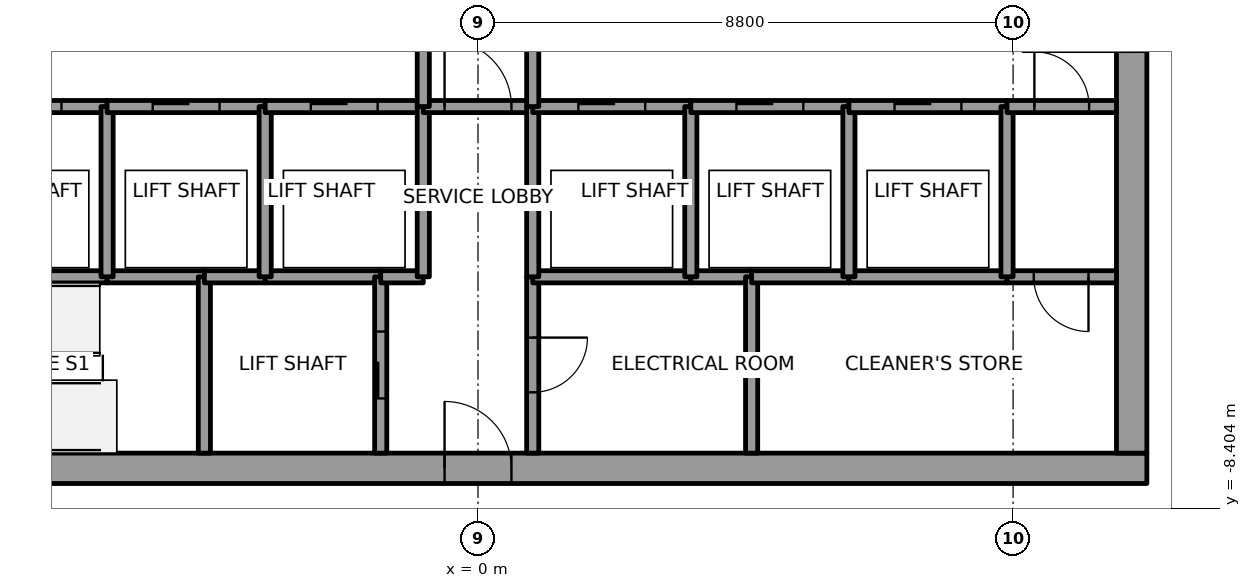
"""IFC4 building model, lengths in metres.
Left out: names, types, materials, properties, quantities, classifications, styles, units other than length and angle.
Written with IfcOpenShell. Run it as: python <this file> out.ifc"""

import sys

from ifc_helpers import new_model, si_unit, direction, frame, frame_2d, origin, place, context, subcontext, project, spatial, rectangle, extrude, element, fill, save


model = new_model("IFC4")
c1 = context("Model", 3, precision=1e-05, world=origin(), true_north=direction((0.0, 1.0)))
c2 = subcontext(c1, "Body", "Model", "MODEL_VIEW")
j1 = project(units=[si_unit("LENGTHUNIT", "METRE"), si_unit("PLANEANGLEUNIT", "RADIAN")], contexts=[c1])
p1 = place(None, origin())
s1 = spatial("IfcSite", under=j1, at=p1, CompositionType="ELEMENT")
p2 = place(p1, origin())
s2 = spatial("IfcBuilding", under=s1, at=p2, CompositionType="ELEMENT")
p3 = place(p2, frame((0.0, 0.0, 283.0)))
s3 = spatial("IfcBuildingStorey", under=s2, at=p3, CompositionType="ELEMENT", Elevation=283.0)
p4 = place(p3, frame((-11.0, -7.75, 0.0), z_axis=(0.0, 0.0, 1.0), x_axis=(1.0, 0.0, 0.0)))
e1 = element("IfcWall", 1, at=p4, inside=s3, PredefinedType="SHEAR", context=c2, shape_type="SweptSolid", body=[
    extrude(rectangle(XDim=22.0, YDim=0.5, at=frame_2d((11.0, 0.0))), origin(), (0.0, 0.0, 1.0), 4.0),
])
p5 = place(p4, frame((10.45, 0.0, 0.0)))
e2 = element("IfcOpeningElement", 2, at=p5, cuts=e1, PredefinedType="OPENING", context=c2, shape_type="SweptSolid", body=[
    extrude(rectangle(XDim=1.1, YDim=2.1, at=frame_2d((0.55, 1.05))), frame((0.0, 0.25, 0.0), z_axis=(0.0, -1.0, 0.0), x_axis=(1.0, 0.0, 0.0)), (0.0, 0.0, 1.0), 0.5),
])
p6 = place(p3, frame((10.75, -7.5, 0.0), z_axis=(0.0, 0.0, 1.0), x_axis=(0.0, 1.0, 0.0)))
e3 = element("IfcWall", 3, at=p6, inside=s3, PredefinedType="SHEAR", context=c2, shape_type="SweptSolid", body=[
    extrude(rectangle(XDim=15.0, YDim=0.5, at=frame_2d((7.5, 0.0))), origin(), (0.0, 0.0, 1.0), 4.0),
])
p7 = place(p6, frame((6.6, 0.0, 0.0)))
e4 = element("IfcOpeningElement", 4, at=p7, cuts=e3, PredefinedType="OPENING", context=c2, shape_type="SweptSolid", body=[
    extrude(rectangle(XDim=1.8, YDim=2.1, at=frame_2d((0.9, 1.05))), frame((0.0, 0.25, 0.0), z_axis=(0.0, -1.0, 0.0), x_axis=(1.0, 0.0, 0.0)), (0.0, 0.0, 1.0), 0.5),
])
p8 = place(p3, frame((-8.7, -4.6, 0.0), z_axis=(0.0, 0.0, 1.0), x_axis=(1.0, 0.0, 0.0)))
e5 = element("IfcWall", 5, at=p8, inside=s3, PredefinedType="SOLIDWALL", context=c2, shape_type="SweptSolid", body=[
    extrude(rectangle(XDim=2.6, YDim=0.2, at=frame_2d((1.3, 0.0))), origin(), (0.0, 0.0, 1.0), 3.85),
])
p9 = place(p3, frame((-8.7, -1.8, 0.0), z_axis=(0.0, 0.0, 1.0), x_axis=(1.0, 0.0, 0.0)))
e6 = element("IfcWall", 6, at=p9, inside=s3, PredefinedType="SOLIDWALL", context=c2, shape_type="SweptSolid", body=[
    extrude(rectangle(XDim=2.6, YDim=0.2, at=frame_2d((1.3, 0.0))), origin(), (0.0, 0.0, 1.0), 3.85),
])
p10 = place(p9, frame((0.75, 0.0, 0.0)))
e7 = element("IfcOpeningElement", 7, at=p10, cuts=e6, PredefinedType="OPENING", context=c2, shape_type="SweptSolid", body=[
    extrude(rectangle(XDim=1.1, YDim=2.1, at=frame_2d((0.55, 1.05))), frame((0.0, 0.1, 0.0), z_axis=(0.0, -1.0, 0.0), x_axis=(1.0, 0.0, 0.0)), (0.0, 0.0, 1.0), 0.2),
])
p11 = place(p3, frame((-6.1, -4.6, 0.0), z_axis=(0.0, 0.0, 1.0), x_axis=(1.0, 0.0, 0.0)))
e8 = element("IfcWall", 8, at=p11, inside=s3, PredefinedType="SOLIDWALL", context=c2, shape_type="SweptSolid", body=[
    extrude(rectangle(XDim=1.6, YDim=0.2, at=frame_2d((0.8, 0.0))), origin(), (0.0, 0.0, 1.0), 3.85),
])
p12 = place(p3, frame((-6.1, -4.6, 0.0), z_axis=(0.0, 0.0, 1.0), x_axis=(0.0, 1.0, 0.0)))
e9 = element("IfcWall", 9, at=p12, inside=s3, PredefinedType="SOLIDWALL", context=c2, shape_type="SweptSolid", body=[
    extrude(rectangle(XDim=2.8, YDim=0.2, at=frame_2d((1.4, 0.0))), origin(), (0.0, 0.0, 1.0), 3.85),
])
p13 = place(p3, frame((-6.1, -1.8, 0.0), z_axis=(0.0, 0.0, 1.0), x_axis=(1.0, 0.0, 0.0)))
e10 = element("IfcWall", 10, at=p13, inside=s3, PredefinedType="SOLIDWALL", context=c2, shape_type="SweptSolid", body=[
    extrude(rectangle(XDim=2.6, YDim=0.2, at=frame_2d((1.3, 0.0))), origin(), (0.0, 0.0, 1.0), 3.85),
])
p14 = place(p13, frame((0.75, 0.0, 0.0)))
e11 = element("IfcOpeningElement", 11, at=p14, cuts=e10, PredefinedType="OPENING", context=c2, shape_type="SweptSolid", body=[
    extrude(rectangle(XDim=1.1, YDim=2.1, at=frame_2d((0.55, 1.05))), frame((0.0, 0.1, 0.0), z_axis=(0.0, -1.0, 0.0), x_axis=(1.0, 0.0, 0.0)), (0.0, 0.0, 1.0), 0.2),
])
p15 = place(p3, frame((-4.5, -4.6, 0.0), z_axis=(0.0, 0.0, 1.0), x_axis=(0.0, -1.0, 0.0)))
e12 = element("IfcWall", 12, at=p15, inside=s3, PredefinedType="SOLIDWALL", context=c2, shape_type="SweptSolid", body=[
    extrude(rectangle(XDim=2.9, YDim=0.2, at=frame_2d((1.45, 0.0))), origin(), (0.0, 0.0, 1.0), 3.85),
])
p16 = place(p3, frame((-4.5, -4.6, 0.0), z_axis=(0.0, 0.0, 1.0), x_axis=(1.0, 0.0, 0.0)))
e13 = element("IfcWall", 13, at=p16, inside=s3, PredefinedType="SOLIDWALL", context=c2, shape_type="SweptSolid", body=[
    extrude(rectangle(XDim=1.0, YDim=0.2, at=frame_2d((0.5, 0.0))), origin(), (0.0, 0.0, 1.0), 3.85),
])
p17 = place(p3, frame((-3.5, -4.6, 0.0), z_axis=(0.0, 0.0, 1.0), x_axis=(1.0, 0.0, 0.0)))
e14 = element("IfcWall", 14, at=p17, inside=s3, PredefinedType="SOLIDWALL", context=c2, shape_type="SweptSolid", body=[
    extrude(rectangle(XDim=1.9, YDim=0.2, at=frame_2d((0.95, 0.0))), origin(), (0.0, 0.0, 1.0), 3.85),
])
p18 = place(p3, frame((-3.5, -4.6, 0.0), z_axis=(0.0, 0.0, 1.0), x_axis=(0.0, 1.0, 0.0)))
e15 = element("IfcWall", 15, at=p18, inside=s3, PredefinedType="SOLIDWALL", context=c2, shape_type="SweptSolid", body=[
    extrude(rectangle(XDim=2.8, YDim=0.2, at=frame_2d((1.4, 0.0))), origin(), (0.0, 0.0, 1.0), 3.85),
])
p19 = place(p3, frame((-3.5, -1.8, 0.0), z_axis=(0.0, 0.0, 1.0), x_axis=(1.0, 0.0, 0.0)))
e16 = element("IfcWall", 16, at=p19, inside=s3, PredefinedType="SOLIDWALL", context=c2, shape_type="SweptSolid", body=[
    extrude(rectangle(XDim=2.6, YDim=0.2, at=frame_2d((1.3, 0.0))), origin(), (0.0, 0.0, 1.0), 3.85),
])
p20 = place(p19, frame((0.75, 0.0, 0.0)))
e17 = element("IfcOpeningElement", 17, at=p20, cuts=e16, PredefinedType="OPENING", context=c2, shape_type="SweptSolid", body=[
    extrude(rectangle(XDim=1.1, YDim=2.1, at=frame_2d((0.55, 1.05))), frame((0.0, 0.1, 0.0), z_axis=(0.0, -1.0, 0.0), x_axis=(1.0, 0.0, 0.0)), (0.0, 0.0, 1.0), 0.2),
])
p21 = place(p3, frame((-1.6, -7.5, 0.0), z_axis=(0.0, 0.0, 1.0), x_axis=(0.0, 1.0, 0.0)))
e18 = element("IfcWall", 18, at=p21, inside=s3, PredefinedType="SOLIDWALL", context=c2, shape_type="SweptSolid", body=[
    extrude(rectangle(XDim=2.9, YDim=0.2, at=frame_2d((1.45, 0.0))), origin(), (0.0, 0.0, 1.0), 3.85),
])
p22 = place(p21, frame((0.9, 0.0, 0.0)))
e19 = element("IfcOpeningElement", 19, at=p22, cuts=e18, PredefinedType="OPENING", context=c2, shape_type="SweptSolid", body=[
    extrude(rectangle(XDim=1.1, YDim=2.1, at=frame_2d((0.55, 1.05))), frame((0.0, 0.1, 0.0), z_axis=(0.0, -1.0, 0.0), x_axis=(1.0, 0.0, 0.0)), (0.0, 0.0, 1.0), 0.2),
])
p23 = place(p3, frame((-1.6, -4.6, 0.0), z_axis=(0.0, 0.0, 1.0), x_axis=(1.0, 0.0, 0.0)))
e20 = element("IfcWall", 20, at=p23, inside=s3, PredefinedType="SOLIDWALL", context=c2, shape_type="SweptSolid", body=[
    extrude(rectangle(XDim=0.7, YDim=0.2, at=frame_2d((0.35, 0.0))), origin(), (0.0, 0.0, 1.0), 3.85),
])
p24 = place(p3, frame((-0.9, -4.6, 0.0), z_axis=(0.0, 0.0, 1.0), x_axis=(0.0, 1.0, 0.0)))
e21 = element("IfcWall", 21, at=p24, inside=s3, PredefinedType="SOLIDWALL", context=c2, shape_type="SweptSolid", body=[
    extrude(rectangle(XDim=2.8, YDim=0.2, at=frame_2d((1.4, 0.0))), origin(), (0.0, 0.0, 1.0), 3.85),
])
p25 = place(p3, frame((-0.9, -1.8, 0.0), z_axis=(0.0, 0.0, 1.0), x_axis=(1.0, 0.0, 0.0)))
e22 = element("IfcWall", 22, at=p25, inside=s3, PredefinedType="SOLIDWALL", context=c2, shape_type="SweptSolid", body=[
    extrude(rectangle(XDim=1.8, YDim=0.2, at=frame_2d((0.9, 0.0))), origin(), (0.0, 0.0, 1.0), 3.85),
])
p26 = place(p25, frame((0.35, 0.0, 0.0)))
e23 = element("IfcOpeningElement", 23, at=p26, cuts=e22, PredefinedType="OPENING", context=c2, shape_type="SweptSolid", body=[
    extrude(rectangle(XDim=1.1, YDim=2.1, at=frame_2d((0.55, 1.05))), frame((0.0, 0.1, 0.0), z_axis=(0.0, -1.0, 0.0), x_axis=(1.0, 0.0, 0.0)), (0.0, 0.0, 1.0), 0.2),
])
p27 = place(p3, frame((-0.9, 1.8, 0.0), z_axis=(0.0, 0.0, 1.0), x_axis=(0.0, -1.0, 0.0)))
e24 = element("IfcWall", 24, at=p27, inside=s3, PredefinedType="SOLIDWALL", context=c2, shape_type="SweptSolid", body=[
    extrude(rectangle(XDim=3.6, YDim=0.2, at=frame_2d((1.8, 0.0))), origin(), (0.0, 0.0, 1.0), 3.85),
])
p28 = place(p27, frame((1.05, 0.0, 0.0)))
e25 = element("IfcOpeningElement", 25, at=p28, cuts=e24, PredefinedType="OPENING", context=c2, shape_type="SweptSolid", body=[
    extrude(rectangle(XDim=1.5, YDim=2.1, at=frame_2d((0.75, 1.05))), frame((0.0, 0.1, 0.0), z_axis=(0.0, -1.0, 0.0), x_axis=(1.0, 0.0, 0.0)), (0.0, 0.0, 1.0), 0.2),
])
p29 = place(p3, frame((0.9, -4.6, 0.0), z_axis=(0.0, 0.0, 1.0), x_axis=(0.0, -1.0, 0.0)))
e26 = element("IfcWall", 26, at=p29, inside=s3, PredefinedType="SOLIDWALL", context=c2, shape_type="SweptSolid", body=[
    extrude(rectangle(XDim=2.9, YDim=0.2, at=frame_2d((1.45, 0.0))), origin(), (0.0, 0.0, 1.0), 3.85),
])
p30 = place(p29, frame((1.0, 0.0, 0.0)))
e27 = element("IfcOpeningElement", 27, at=p30, cuts=e26, PredefinedType="OPENING", context=c2, shape_type="SweptSolid", body=[
    extrude(rectangle(XDim=0.9, YDim=2.1, at=frame_2d((0.45, 1.05))), frame((0.0, 0.1, 0.0), z_axis=(0.0, -1.0, 0.0), x_axis=(1.0, 0.0, 0.0)), (0.0, 0.0, 1.0), 0.2),
])
p31 = place(p3, frame((3.5, -4.6, 0.0), z_axis=(0.0, 0.0, 1.0), x_axis=(-1.0, 0.0, 0.0)))
e28 = element("IfcWall", 28, at=p31, inside=s3, PredefinedType="SOLIDWALL", context=c2, shape_type="SweptSolid", body=[
    extrude(rectangle(XDim=2.6, YDim=0.2, at=frame_2d((1.3, 0.0))), origin(), (0.0, 0.0, 1.0), 3.85),
])
p32 = place(p3, frame((0.9, -1.8, 0.0), z_axis=(0.0, 0.0, 1.0), x_axis=(0.0, -1.0, 0.0)))
e29 = element("IfcWall", 29, at=p32, inside=s3, PredefinedType="SOLIDWALL", context=c2, shape_type="SweptSolid", body=[
    extrude(rectangle(XDim=2.8, YDim=0.2, at=frame_2d((1.4, 0.0))), origin(), (0.0, 0.0, 1.0), 3.85),
])
p33 = place(p3, frame((0.9, -1.8, 0.0), z_axis=(0.0, 0.0, 1.0), x_axis=(1.0, 0.0, 0.0)))
e30 = element("IfcWall", 30, at=p33, inside=s3, PredefinedType="SOLIDWALL", context=c2, shape_type="SweptSolid", body=[
    extrude(rectangle(XDim=2.6, YDim=0.2, at=frame_2d((1.3, 0.0))), origin(), (0.0, 0.0, 1.0), 3.85),
])
p34 = place(p33, frame((0.75, 0.0, 0.0)))
e31 = element("IfcOpeningElement", 31, at=p34, cuts=e30, PredefinedType="OPENING", context=c2, shape_type="SweptSolid", body=[
    extrude(rectangle(XDim=1.1, YDim=2.1, at=frame_2d((0.55, 1.05))), frame((0.0, 0.1, 0.0), z_axis=(0.0, -1.0, 0.0), x_axis=(1.0, 0.0, 0.0)), (0.0, 0.0, 1.0), 0.2),
])
p35 = place(p3, frame((0.9, -1.8, 0.0), z_axis=(0.0, 0.0, 1.0), x_axis=(0.0, 1.0, 0.0)))
e32 = element("IfcWall", 32, at=p35, inside=s3, PredefinedType="SOLIDWALL", context=c2, shape_type="SweptSolid", body=[
    extrude(rectangle(XDim=3.6, YDim=0.2, at=frame_2d((1.8, 0.0))), origin(), (0.0, 0.0, 1.0), 3.85),
])
p36 = place(p35, frame((1.05, 0.0, 0.0)))
e33 = element("IfcOpeningElement", 33, at=p36, cuts=e32, PredefinedType="OPENING", context=c2, shape_type="SweptSolid", body=[
    extrude(rectangle(XDim=1.5, YDim=2.1, at=frame_2d((0.75, 1.05))), frame((0.0, 0.1, 0.0), z_axis=(0.0, -1.0, 0.0), x_axis=(1.0, 0.0, 0.0)), (0.0, 0.0, 1.0), 0.2),
])
p37 = place(p3, frame((4.5, -4.6, 0.0), z_axis=(0.0, 0.0, 1.0), x_axis=(-1.0, 0.0, 0.0)))
e34 = element("IfcWall", 34, at=p37, inside=s3, PredefinedType="SOLIDWALL", context=c2, shape_type="SweptSolid", body=[
    extrude(rectangle(XDim=1.0, YDim=0.2, at=frame_2d((0.5, 0.0))), origin(), (0.0, 0.0, 1.0), 3.85),
])
p38 = place(p3, frame((3.5, -4.6, 0.0), z_axis=(0.0, 0.0, 1.0), x_axis=(0.0, 1.0, 0.0)))
e35 = element("IfcWall", 35, at=p38, inside=s3, PredefinedType="SOLIDWALL", context=c2, shape_type="SweptSolid", body=[
    extrude(rectangle(XDim=2.8, YDim=0.2, at=frame_2d((1.4, 0.0))), origin(), (0.0, 0.0, 1.0), 3.85),
])
p39 = place(p3, frame((3.5, -1.8, 0.0), z_axis=(0.0, 0.0, 1.0), x_axis=(1.0, 0.0, 0.0)))
e36 = element("IfcWall", 36, at=p39, inside=s3, PredefinedType="SOLIDWALL", context=c2, shape_type="SweptSolid", body=[
    extrude(rectangle(XDim=2.6, YDim=0.2, at=frame_2d((1.3, 0.0))), origin(), (0.0, 0.0, 1.0), 3.85),
])
p40 = place(p39, frame((0.75, 0.0, 0.0)))
e37 = element("IfcOpeningElement", 37, at=p40, cuts=e36, PredefinedType="OPENING", context=c2, shape_type="SweptSolid", body=[
    extrude(rectangle(XDim=1.1, YDim=2.1, at=frame_2d((0.55, 1.05))), frame((0.0, 0.1, 0.0), z_axis=(0.0, -1.0, 0.0), x_axis=(1.0, 0.0, 0.0)), (0.0, 0.0, 1.0), 0.2),
])
p41 = place(p3, frame((4.5, -4.6, 0.0), z_axis=(0.0, 0.0, 1.0), x_axis=(0.0, -1.0, 0.0)))
e38 = element("IfcWall", 38, at=p41, inside=s3, PredefinedType="SOLIDWALL", context=c2, shape_type="SweptSolid", body=[
    extrude(rectangle(XDim=2.9, YDim=0.2, at=frame_2d((1.45, 0.0))), origin(), (0.0, 0.0, 1.0), 3.85),
])
p42 = place(p3, frame((6.1, -4.6, 0.0), z_axis=(0.0, 0.0, 1.0), x_axis=(-1.0, 0.0, 0.0)))
e39 = element("IfcWall", 39, at=p42, inside=s3, PredefinedType="SOLIDWALL", context=c2, shape_type="SweptSolid", body=[
    extrude(rectangle(XDim=1.6, YDim=0.2, at=frame_2d((0.8, 0.0))), origin(), (0.0, 0.0, 1.0), 3.85),
])
p43 = place(p3, frame((8.7, -4.6, 0.0), z_axis=(0.0, 0.0, 1.0), x_axis=(-1.0, 0.0, 0.0)))
e40 = element("IfcWall", 40, at=p43, inside=s3, PredefinedType="SOLIDWALL", context=c2, shape_type="SweptSolid", body=[
    extrude(rectangle(XDim=2.6, YDim=0.2, at=frame_2d((1.3, 0.0))), origin(), (0.0, 0.0, 1.0), 3.85),
])
p44 = place(p3, frame((6.1, -4.6, 0.0), z_axis=(0.0, 0.0, 1.0), x_axis=(0.0, 1.0, 0.0)))
e41 = element("IfcWall", 41, at=p44, inside=s3, PredefinedType="SOLIDWALL", context=c2, shape_type="SweptSolid", body=[
    extrude(rectangle(XDim=2.8, YDim=0.2, at=frame_2d((1.4, 0.0))), origin(), (0.0, 0.0, 1.0), 3.85),
])
p45 = place(p3, frame((6.1, -1.8, 0.0), z_axis=(0.0, 0.0, 1.0), x_axis=(1.0, 0.0, 0.0)))
e42 = element("IfcWall", 42, at=p45, inside=s3, PredefinedType="SOLIDWALL", context=c2, shape_type="SweptSolid", body=[
    extrude(rectangle(XDim=2.6, YDim=0.2, at=frame_2d((1.3, 0.0))), origin(), (0.0, 0.0, 1.0), 3.85),
])
p46 = place(p45, frame((0.75, 0.0, 0.0)))
e43 = element("IfcOpeningElement", 43, at=p46, cuts=e42, PredefinedType="OPENING", context=c2, shape_type="SweptSolid", body=[
    extrude(rectangle(XDim=1.1, YDim=2.1, at=frame_2d((0.55, 1.05))), frame((0.0, 0.1, 0.0), z_axis=(0.0, -1.0, 0.0), x_axis=(1.0, 0.0, 0.0)), (0.0, 0.0, 1.0), 0.2),
])
p47 = place(p3, frame((10.5, -4.6, 0.0), z_axis=(0.0, 0.0, 1.0), x_axis=(-1.0, 0.0, 0.0)))
e44 = element("IfcWall", 44, at=p47, inside=s3, PredefinedType="SOLIDWALL", context=c2, shape_type="SweptSolid", body=[
    extrude(rectangle(XDim=1.8, YDim=0.2, at=frame_2d((0.9, 0.0))), origin(), (0.0, 0.0, 1.0), 3.85),
])
p48 = place(p47, frame((0.46, 0.0, 0.0)))
e45 = element("IfcOpeningElement", 45, at=p48, cuts=e44, PredefinedType="OPENING", context=c2, shape_type="SweptSolid", body=[
    extrude(rectangle(XDim=0.9, YDim=2.1, at=frame_2d((0.45, 1.05))), frame((0.0, 0.1, 0.0), z_axis=(0.0, -1.0, 0.0), x_axis=(1.0, 0.0, 0.0)), (0.0, 0.0, 1.0), 0.2),
])
p49 = place(p3, frame((8.7, -1.8, 0.0), z_axis=(0.0, 0.0, 1.0), x_axis=(0.0, -1.0, 0.0)))
e46 = element("IfcWall", 46, at=p49, inside=s3, PredefinedType="SOLIDWALL", context=c2, shape_type="SweptSolid", body=[
    extrude(rectangle(XDim=2.8, YDim=0.2, at=frame_2d((1.4, 0.0))), origin(), (0.0, 0.0, 1.0), 3.85),
])
p50 = place(p3, frame((8.7, -1.8, 0.0), z_axis=(0.0, 0.0, 1.0), x_axis=(1.0, 0.0, 0.0)))
e47 = element("IfcWall", 47, at=p50, inside=s3, PredefinedType="SOLIDWALL", context=c2, shape_type="SweptSolid", body=[
    extrude(rectangle(XDim=1.8, YDim=0.2, at=frame_2d((0.9, 0.0))), origin(), (0.0, 0.0, 1.0), 3.85),
])
p51 = place(p50, frame((0.45, 0.0, 0.0)))
e48 = element("IfcOpeningElement", 48, at=p51, cuts=e47, PredefinedType="OPENING", context=c2, shape_type="SweptSolid", body=[
    extrude(rectangle(XDim=0.9, YDim=2.1, at=frame_2d((0.45, 1.05))), frame((0.0, 0.1, 0.0), z_axis=(0.0, -1.0, 0.0), x_axis=(1.0, 0.0, 0.0)), (0.0, 0.0, 1.0), 0.2),
])
p52 = place(p10, origin())
e49 = element("IfcDoor", 49, at=p52, inside=s3, OperationType="SLIDING_TO_LEFT", PredefinedType="DOOR", context=c2, shape_type="SweptSolid", body=[
    extrude(rectangle(XDim=1.1, YDim=2.1, at=frame_2d((0.55, 1.05))), frame((0.0, 0.025, 0.0), z_axis=(0.0, -1.0, 0.0), x_axis=(1.0, 0.0, 0.0)), (0.0, 0.0, 1.0), 0.05),
])
fill(e7, e49)
p53 = place(p14, origin())
e50 = element("IfcDoor", 50, at=p53, inside=s3, OperationType="SLIDING_TO_LEFT", PredefinedType="DOOR", context=c2, shape_type="SweptSolid", body=[
    extrude(rectangle(XDim=1.1, YDim=2.1, at=frame_2d((0.55, 1.05))), frame((0.0, 0.025, 0.0), z_axis=(0.0, -1.0, 0.0), x_axis=(1.0, 0.0, 0.0)), (0.0, 0.0, 1.0), 0.05),
])
fill(e11, e50)
p54 = place(p20, origin())
e51 = element("IfcDoor", 51, at=p54, inside=s3, OperationType="SLIDING_TO_LEFT", PredefinedType="DOOR", context=c2, shape_type="SweptSolid", body=[
    extrude(rectangle(XDim=1.1, YDim=2.1, at=frame_2d((0.55, 1.05))), frame((0.0, 0.025, 0.0), z_axis=(0.0, -1.0, 0.0), x_axis=(1.0, 0.0, 0.0)), (0.0, 0.0, 1.0), 0.05),
])
fill(e17, e51)
p55 = place(p34, origin())
e52 = element("IfcDoor", 52, at=p55, inside=s3, OperationType="SLIDING_TO_LEFT", PredefinedType="DOOR", context=c2, shape_type="SweptSolid", body=[
    extrude(rectangle(XDim=1.1, YDim=2.1, at=frame_2d((0.55, 1.05))), frame((0.0, 0.025, 0.0), z_axis=(0.0, -1.0, 0.0), x_axis=(1.0, 0.0, 0.0)), (0.0, 0.0, 1.0), 0.05),
])
fill(e31, e52)
p56 = place(p40, origin())
e53 = element("IfcDoor", 53, at=p56, inside=s3, OperationType="SLIDING_TO_RIGHT", PredefinedType="DOOR", context=c2, shape_type="SweptSolid", body=[
    extrude(rectangle(XDim=1.1, YDim=2.1, at=frame_2d((0.55, 1.05))), frame((0.0, 0.025, 0.0), z_axis=(0.0, -1.0, 0.0), x_axis=(1.0, 0.0, 0.0)), (0.0, 0.0, 1.0), 0.05),
])
fill(e37, e53)
p57 = place(p46, origin())
e54 = element("IfcDoor", 54, at=p57, inside=s3, OperationType="SLIDING_TO_RIGHT", PredefinedType="DOOR", context=c2, shape_type="SweptSolid", body=[
    extrude(rectangle(XDim=1.1, YDim=2.1, at=frame_2d((0.55, 1.05))), frame((0.0, 0.025, 0.0), z_axis=(0.0, -1.0, 0.0), x_axis=(1.0, 0.0, 0.0)), (0.0, 0.0, 1.0), 0.05),
])
fill(e43, e54)
p58 = place(p22, origin())
e55 = element("IfcDoor", 55, at=p58, inside=s3, OperationType="SLIDING_TO_RIGHT", PredefinedType="DOOR", context=c2, shape_type="SweptSolid", body=[
    extrude(rectangle(XDim=1.1, YDim=2.1, at=frame_2d((0.55, 1.05))), frame((0.0, 0.025, 0.0), z_axis=(0.0, -1.0, 0.0), x_axis=(1.0, 0.0, 0.0)), (0.0, 0.0, 1.0), 0.05),
])
fill(e19, e55)
p59 = place(p26, origin())
e56 = element("IfcDoor", 56, at=p59, inside=s3, OperationType="SINGLE_SWING_RIGHT", PredefinedType="DOOR", context=c2, shape_type="SweptSolid", body=[
    extrude(rectangle(XDim=1.1, YDim=2.1, at=frame_2d((0.55, 1.05))), frame((0.0, 0.025, 0.0), z_axis=(0.0, -1.0, 0.0), x_axis=(1.0, 0.0, 0.0)), (0.0, 0.0, 1.0), 0.05),
])
fill(e23, e56)
p60 = place(p48, origin())
e57 = element("IfcDoor", 57, at=p60, inside=s3, OperationType="SINGLE_SWING_LEFT", PredefinedType="DOOR", context=c2, shape_type="SweptSolid", body=[
    extrude(rectangle(XDim=0.9, YDim=2.1, at=frame_2d((0.45, 1.05))), frame((0.0, 0.025, 0.0), z_axis=(0.0, -1.0, 0.0), x_axis=(1.0, 0.0, 0.0)), (0.0, 0.0, 1.0), 0.05),
])
fill(e45, e57)
p61 = place(p51, origin())
e58 = element("IfcDoor", 58, at=p61, inside=s3, OperationType="SINGLE_SWING_LEFT", PredefinedType="DOOR", context=c2, shape_type="SweptSolid", body=[
    extrude(rectangle(XDim=0.9, YDim=2.1, at=frame_2d((0.45, 1.05))), frame((0.0, 0.025, 0.0), z_axis=(0.0, -1.0, 0.0), x_axis=(1.0, 0.0, 0.0)), (0.0, 0.0, 1.0), 0.05),
])
fill(e48, e58)
p62 = place(p30, origin())
e59 = element("IfcDoor", 59, at=p62, inside=s3, OperationType="SINGLE_SWING_RIGHT", PredefinedType="DOOR", context=c2, shape_type="SweptSolid", body=[
    extrude(rectangle(XDim=0.9, YDim=2.1, at=frame_2d((0.45, 1.05))), frame((0.0, 0.025, 0.0), z_axis=(0.0, -1.0, 0.0), x_axis=(1.0, 0.0, 0.0)), (0.0, 0.0, 1.0), 0.05),
])
fill(e27, e59)
p63 = place(p7, origin())
e60 = element("IfcDoor", 60, at=p63, inside=s3, OperationType="DOUBLE_DOOR_SINGLE_SWING", PredefinedType="DOOR", context=c2, shape_type="SweptSolid", body=[
    extrude(rectangle(XDim=1.8, YDim=2.1, at=frame_2d((0.9, 1.05))), frame((0.0, 0.025, 0.0), z_axis=(0.0, -1.0, 0.0), x_axis=(1.0, 0.0, 0.0)), (0.0, 0.0, 1.0), 0.05),
])
fill(e4, e60)
p64 = place(p5, origin())
e61 = element("IfcDoor", 61, at=p64, inside=s3, OperationType="SINGLE_SWING_LEFT", PredefinedType="DOOR", context=c2, shape_type="SweptSolid", body=[
    extrude(rectangle(XDim=1.1, YDim=2.1, at=frame_2d((0.55, 1.05))), frame((0.0, 0.025, 0.0), z_axis=(0.0, -1.0, 0.0), x_axis=(1.0, 0.0, 0.0)), (0.0, 0.0, 1.0), 0.05),
])
fill(e2, e61)
save(model, sys.argv[1])
